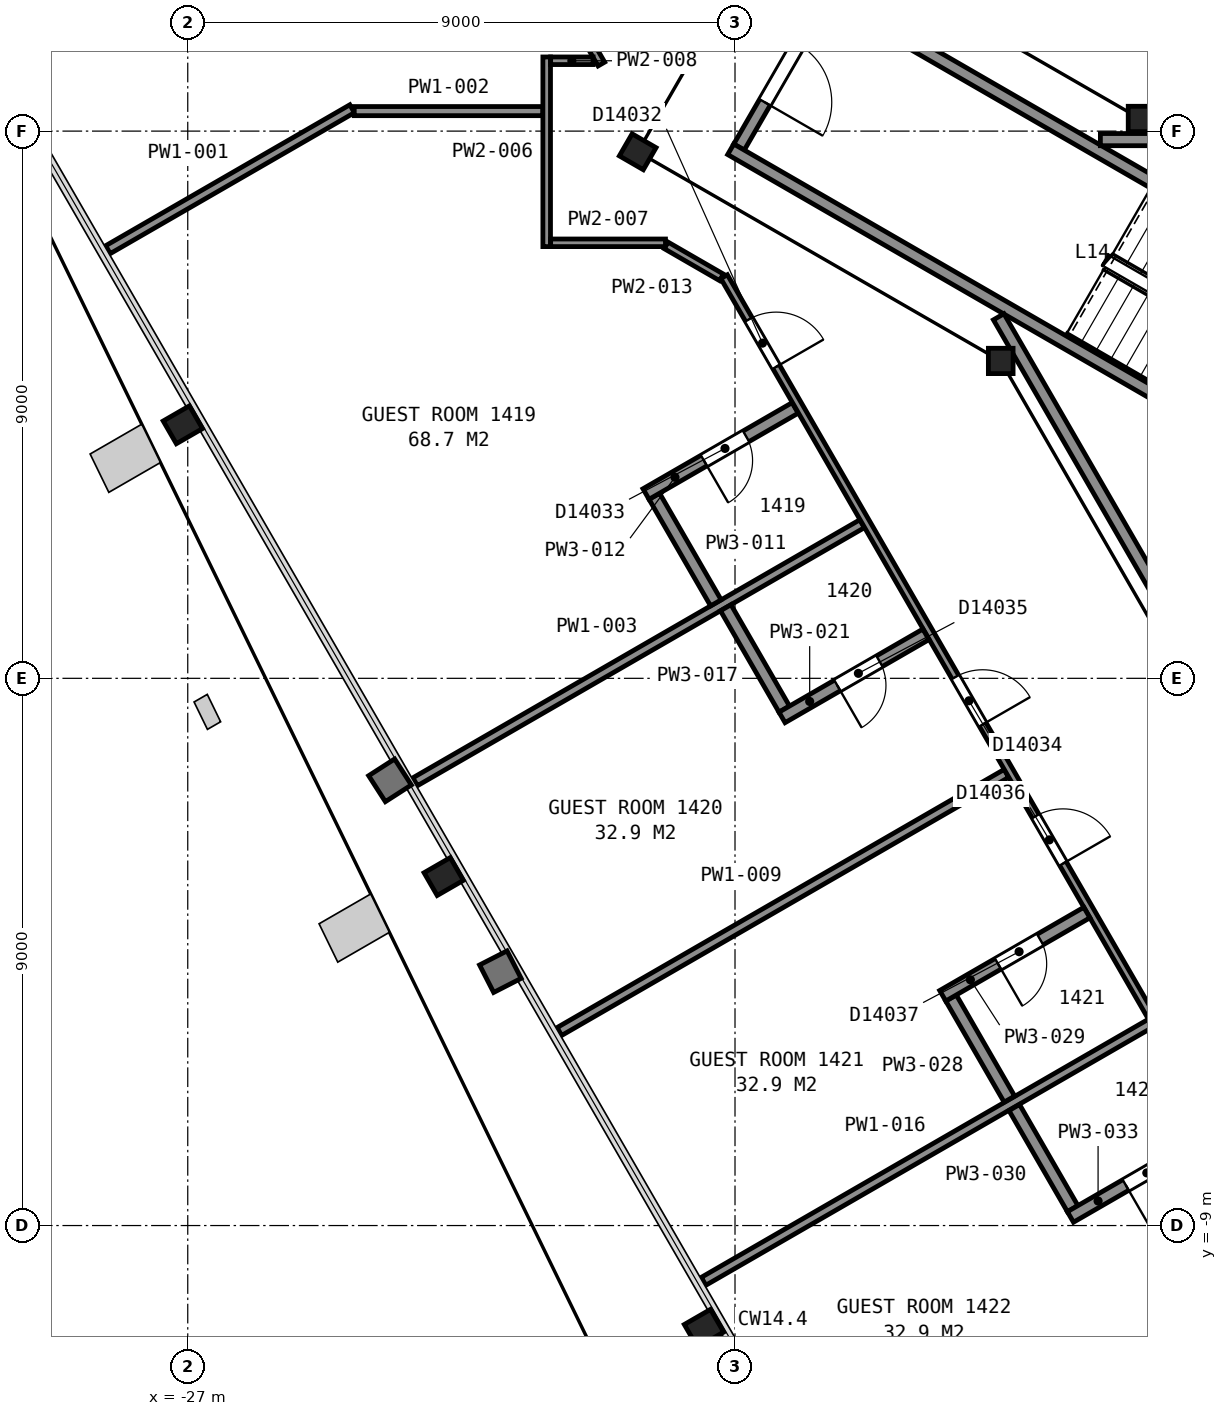
"""IFC4 building model, lengths in metres.
Left out: names, types, materials, properties, quantities, classifications, styles, units other than length and angle.
Written with IfcOpenShell. Run it as: python <this file> out.ifc"""

import sys

from ifc_helpers import new_model, si_unit, direction, frame, frame_2d, origin, origin_2d, place, context, subcontext, project, spatial, rectangle, i_section, extrude, element, fill, save


model = new_model("IFC4")
c1 = context("Model", 3, precision=1e-05, world=origin(), true_north=direction((0.0, 1.0)))
c2 = subcontext(c1, "Body", "Model", "MODEL_VIEW")
j1 = project(units=[si_unit("LENGTHUNIT", "METRE"), si_unit("PLANEANGLEUNIT", "RADIAN")], contexts=[c1])
p1 = place(None, origin())
s1 = spatial("IfcSite", under=j1, at=p1, CompositionType="ELEMENT")
p2 = place(p1, origin())
s2 = spatial("IfcBuilding", under=s1, at=p2, CompositionType="ELEMENT")
p3 = place(p2, frame((0.0, 0.0, 65.6)))
s3 = spatial("IfcBuildingStorey", under=s2, at=p3, CompositionType="ELEMENT", Elevation=65.6)
for number, where, z_axis, x_axis in (
    (1, (-27.08, 4.17, 0.025), (0.0, 0.0, 1.0), (-0.5, 0.866, 0.0)),
    (2, (-22.79, -3.26, 0.025), (0.0, 0.0, 1.0), (-0.5, 0.866, 0.0)),
    (3, (-18.51, -10.69, 0.025), (0.0, 0.0, 1.0), (-0.5, 0.866, 0.0)),
):
    element("IfcColumn", number, at=place(p3, frame(where, z_axis=z_axis, x_axis=x_axis)), inside=s3, PredefinedType="COLUMN", context=c2, shape_type="SweptSolid", body=[
        extrude(i_section(OverallWidth=0.432, OverallDepth=0.498, WebThickness=0.056, FlangeThickness=0.089, FilletRadius=0.015, at=origin_2d()), origin(), (0.0, 0.0, 1.0), 3.575),
    ])
p4 = place(p3, frame((-11.33, 9.2, 0.0), z_axis=(0.0, 0.0, 1.0), x_axis=(1.0, 0.0, 0.0)))
e4 = element("IfcColumn", 4, at=p4, inside=s3, PredefinedType="COLUMN", context=c2, shape_type="SweptSolid", body=[
    extrude(i_section(OverallWidth=0.406, OverallDepth=0.417, WebThickness=0.03, FlangeThickness=0.048, FilletRadius=0.015, at=origin_2d()), origin(), (0.0, 0.0, 1.0), 3.6),
])
p5 = place(p3, frame((-19.6, 8.66, 0.0), z_axis=(0.0, 0.0, 1.0), x_axis=(0.5, 0.866025403784, 0.0)))
e5 = element("IfcColumn", 5, at=p5, inside=s3, PredefinedType="COLUMN", context=c2, shape_type="SweptSolid", body=[
    extrude(i_section(OverallWidth=0.419, OverallDepth=0.455, WebThickness=0.042, FlangeThickness=0.068, FilletRadius=0.015, at=origin_2d()), origin(), (0.0, 0.0, 1.0), 3.6),
])
p6 = place(p3, frame((-13.63, 5.22, 0.0), z_axis=(0.0, 0.0, 1.0), x_axis=(1.0, 0.0, 0.0)))
e6 = element("IfcColumn", 6, at=p6, inside=s3, PredefinedType="COLUMN", context=c2, shape_type="SweptSolid", body=[
    extrude(i_section(OverallWidth=0.406, OverallDepth=0.417, WebThickness=0.03, FlangeThickness=0.048, FilletRadius=0.015, at=origin_2d()), origin(), (0.0, 0.0, 1.0), 3.6),
])
p7 = place(p3, frame((-16.534, 11.162, 0.0), z_axis=(0.0, 0.0, 1.0), x_axis=(-0.49998411664, -0.866034573852, 0.0)))
e7 = element("IfcWall", 7, at=p7, inside=s3, PredefinedType="PARTITIONING", context=c2, shape_type="SweptSolid", body=[
    extrude(rectangle(XDim=2.8, YDim=0.2, at=frame_2d((1.4, 0.0))), origin(), (0.0, 0.0, 1.0), 3.35),
])
p8 = place(p7, frame((0.85, 0.0, 0.0)))
e8 = element("IfcOpeningElement", 8, at=p8, cuts=e7, PredefinedType="OPENING", context=c2, shape_type="SweptSolid", body=[
    extrude(rectangle(XDim=1.1, YDim=2.1, at=frame_2d((0.55, 1.05))), frame((0.0, 0.11, 0.0), z_axis=(0.0, -1.0, 0.0), x_axis=(1.0, 0.0, 0.0)), (0.0, 0.0, 1.0), 0.22),
])
for number, where, z_axis, x_axis in (
    (9, (-7.678, 2.701, 0.0), (0.0, 0.0, 1.0), (-0.866, 0.5, 0.0)),
    (10, (-6.178, 5.299, 0.0), (0.0, 0.0, 1.0), (-0.866, 0.5, 0.0)),
):
    element("IfcWall", number, at=place(p3, frame(where, z_axis=z_axis, x_axis=x_axis)), inside=s3, PredefinedType="PARTITIONING", context=c2, shape_type="SweptSolid", body=[
        extrude(rectangle(XDim=12.0, YDim=0.2, at=frame_2d((6.0, 0.0))), origin(), (0.0, 0.0, 1.0), 3.35),
    ])
p9 = place(p3, frame((-13.664, 5.946, 0.0), z_axis=(0.0, 0.0, 1.0), x_axis=(0.499994327219, -0.866028678941, 0.0)))
e11 = element("IfcWall", 11, at=p9, inside=s3, PredefinedType="PARTITIONING", context=c2, shape_type="SweptSolid", body=[
    extrude(rectangle(XDim=23.968, YDim=0.2, at=frame_2d((11.984, 0.0))), origin(), (0.0, 0.0, 1.0), 3.35),
])
p10 = place(p3, frame((0.263, 8.86, 0.0), z_axis=(0.0, 0.0, 1.0), x_axis=(-1.0, 0.0, 0.0)))
e12 = element("IfcWall", 12, at=p10, inside=s3, PredefinedType="PARTITIONING", context=c2, shape_type="SweptSolid", body=[
    extrude(rectangle(XDim=12.254, YDim=0.2, at=frame_2d((6.127, 0.0))), origin(), (0.0, 0.0, 1.0), 3.35),
])
p11 = place(p10, frame((5.709, 0.0, 0.0)))
e13 = element("IfcOpeningElement", 13, at=p11, cuts=e12, PredefinedType="OPENING", context=c2, shape_type="SweptSolid", body=[
    extrude(rectangle(XDim=1.8, YDim=2.1, at=frame_2d((0.9, 1.05))), frame((0.0, 0.11, 0.0), z_axis=(0.0, -1.0, 0.0), x_axis=(1.0, 0.0, 0.0)), (0.0, 0.0, 1.0), 0.22),
])
p12 = place(p3, frame((-28.313, 7.05, 0.0), z_axis=(0.0, 0.0, 1.0), x_axis=(0.866076865069, 0.499910855846, 0.0)))
e14 = element("IfcWall", 14, at=p12, inside=s3, PredefinedType="PARTITIONING", context=c2, shape_type="SweptSolid", body=[
    extrude(rectangle(XDim=4.636, YDim=0.15, at=frame_2d((2.318, 0.0))), origin(), (0.0, 0.0, 1.0), 2.613),
])
p13 = place(p3, frame((-24.262, 9.329, 0.0), z_axis=(0.0, 0.0, 1.0), x_axis=(1.0, 0.0, 0.0)))
e15 = element("IfcWall", 15, at=p13, inside=s3, PredefinedType="PARTITIONING", context=c2, shape_type="SweptSolid", body=[
    extrude(rectangle(XDim=3.103, YDim=0.15, at=frame_2d((1.551, 0.0))), origin(), (0.0, 0.0, 1.0), 2.613),
])
p14 = place(p3, frame((-23.26, -1.701, 0.0), z_axis=(0.0, 0.0, 1.0), x_axis=(0.866027021296, 0.499997198377, 0.0)))
e16 = element("IfcWall", 16, at=p14, inside=s3, PredefinedType="PARTITIONING", context=c2, shape_type="SweptSolid", body=[
    extrude(rectangle(XDim=8.487, YDim=0.15, at=frame_2d((4.243, 0.0))), origin(), (0.0, 0.0, 1.0), 2.613),
])
p15 = place(p3, frame((-21.132, 11.721, 0.0), z_axis=(0.0, 0.0, 1.0), x_axis=(0.500072997275, -0.865983254686, 0.0)))
e17 = element("IfcWall", 17, at=p15, inside=s3, PredefinedType="PARTITIONING", context=c2, shape_type="SweptSolid", body=[
    extrude(rectangle(XDim=1.869, YDim=0.125, at=frame_2d((0.935, 0.0))), origin(), (0.0, 0.0, 1.0), 2.613),
])
p16 = place(p3, frame((-21.097, 7.101, 0.0), z_axis=(0.0, 0.0, 1.0), x_axis=(0.0, 1.0, 0.0)))
e18 = element("IfcWall", 18, at=p16, inside=s3, PredefinedType="PARTITIONING", context=c2, shape_type="SweptSolid", body=[
    extrude(rectangle(XDim=3.119, YDim=0.125, at=frame_2d((1.56, 0.0))), origin(), (0.0, 0.0, 1.0), 2.613),
])
p17 = place(p3, frame((-21.032, 7.163, 0.0), z_axis=(0.0, 0.0, 1.0), x_axis=(1.0, 0.0, 0.0)))
e19 = element("IfcWall", 19, at=p17, inside=s3, PredefinedType="PARTITIONING", context=c2, shape_type="SweptSolid", body=[
    extrude(rectangle(XDim=1.888, YDim=0.125, at=frame_2d((0.944, 0.0))), origin(), (0.0, 0.0, 1.0), 2.613),
])
p18 = place(p3, frame((-21.032, 10.157, 0.0), z_axis=(0.0, 0.0, 1.0), x_axis=(1.0, 0.0, 0.0)))
e20 = element("IfcWall", 20, at=p18, inside=s3, PredefinedType="PARTITIONING", context=c2, shape_type="SweptSolid", body=[
    extrude(rectangle(XDim=0.698, YDim=0.125, at=frame_2d((0.349, 0.0))), origin(), (0.0, 0.0, 1.0), 2.613),
])
p19 = place(p3, frame((-20.889, -5.809, 0.0), z_axis=(0.0, 0.0, 1.0), x_axis=(0.866022790583, 0.50000452617, 0.0)))
e21 = element("IfcWall", 21, at=p19, inside=s3, PredefinedType="PARTITIONING", context=c2, shape_type="SweptSolid", body=[
    extrude(rectangle(XDim=8.491, YDim=0.15, at=frame_2d((4.246, 0.0))), origin(), (0.0, 0.0, 1.0), 2.613),
])
p20 = place(p3, frame((-19.327, 2.994, 0.0), z_axis=(0.0, 0.0, 1.0), x_axis=(0.500042536776, -0.866000843773, 0.0)))
e22 = element("IfcWall", 22, at=p20, inside=s3, PredefinedType="PARTITIONING", context=c2, shape_type="SweptSolid", body=[
    extrude(rectangle(XDim=2.025, YDim=0.2, at=frame_2d((1.012, 0.0))), origin(), (0.0, 0.0, 1.0), 2.613),
])
p21 = place(p3, frame((-17.01, 4.447, 0.0), z_axis=(0.0, 0.0, 1.0), x_axis=(-0.866033446572, -0.499986069224, 0.0)))
e23 = element("IfcWall", 23, at=p21, inside=s3, PredefinedType="PARTITIONING", context=c2, shape_type="SweptSolid", body=[
    extrude(rectangle(XDim=2.833, YDim=0.2, at=frame_2d((1.416, 0.0))), origin(), (0.0, 0.0, 1.0), 2.613),
])
p22 = place(p21, frame((0.933, 0.0, 0.0)))
e24 = element("IfcOpeningElement", 24, at=p22, cuts=e23, PredefinedType="OPENING", context=c2, shape_type="SweptSolid", body=[
    extrude(rectangle(XDim=0.8, YDim=2.1, at=frame_2d((0.4, 1.05))), frame((0.0, 0.11, 0.0), z_axis=(0.0, -1.0, 0.0), x_axis=(1.0, 0.0, 0.0)), (0.0, 0.0, 1.0), 0.22),
])
p23 = place(p3, frame((-19.132, 7.121, 0.0), z_axis=(0.0, 0.0, 1.0), x_axis=(0.865876245925, -0.500258260045, 0.0)))
e25 = element("IfcWall", 25, at=p23, inside=s3, PredefinedType="PARTITIONING", context=c2, shape_type="SweptSolid", body=[
    extrude(rectangle(XDim=1.052, YDim=0.125, at=frame_2d((0.526, 0.0))), origin(), (0.0, 0.0, 1.0), 2.613),
])
p24 = place(p3, frame((-18.517, -9.917, 0.0), z_axis=(0.0, 0.0, 1.0), x_axis=(0.866017528739, 0.50001363973, 0.0)))
e26 = element("IfcWall", 26, at=p24, inside=s3, PredefinedType="PARTITIONING", context=c2, shape_type="SweptSolid", body=[
    extrude(rectangle(XDim=8.491, YDim=0.15, at=frame_2d((4.246, 0.0))), origin(), (0.0, 0.0, 1.0), 2.613),
])
p25 = place(p3, frame((-18.153, 1.161, 0.0), z_axis=(0.0, 0.0, 1.0), x_axis=(0.499971247393, -0.866042003473, 0.0)))
e27 = element("IfcWall", 27, at=p25, inside=s3, PredefinedType="PARTITIONING", context=c2, shape_type="SweptSolid", body=[
    extrude(rectangle(XDim=1.925, YDim=0.2, at=frame_2d((0.963, 0.0))), origin(), (0.0, 0.0, 1.0), 2.613),
])
p26 = place(p3, frame((-3.766, -18.358, 0.0), z_axis=(0.0, 0.0, 1.0), x_axis=(-0.500003973642, 0.866023109589, 0.0)))
e28 = element("IfcWall", 28, at=p26, inside=s3, PredefinedType="PARTITIONING", context=c2, shape_type="SweptSolid", body=[
    extrude(rectangle(XDim=28.826, YDim=0.125, at=frame_2d((14.413, 0.0))), origin(), (0.0, 0.0, 1.0), 2.613),
])
p27 = place(p26, frame((27.114, 0.0, 0.0)))
e29 = element("IfcOpeningElement", 29, at=p27, cuts=e28, PredefinedType="OPENING", context=c2, shape_type="SweptSolid", body=[
    extrude(rectangle(XDim=0.9, YDim=2.1, at=frame_2d((0.45, 1.05))), frame((0.0, 0.073, 0.0), z_axis=(0.0, -1.0, 0.0), x_axis=(1.0, 0.0, 0.0)), (0.0, 0.0, 1.0), 0.145),
])
p28 = place(p26, frame((20.322, 0.0, 0.0)))
e30 = element("IfcOpeningElement", 30, at=p28, cuts=e28, PredefinedType="OPENING", context=c2, shape_type="SweptSolid", body=[
    extrude(rectangle(XDim=0.9, YDim=2.1, at=frame_2d((0.45, 1.05))), frame((0.0, 0.073, 0.0), z_axis=(0.0, -1.0, 0.0), x_axis=(1.0, 0.0, 0.0)), (0.0, 0.0, 1.0), 0.145),
])
p29 = place(p26, frame((17.68, 0.0, 0.0)))
e31 = element("IfcOpeningElement", 31, at=p29, cuts=e28, PredefinedType="OPENING", context=c2, shape_type="SweptSolid", body=[
    extrude(rectangle(XDim=0.9, YDim=2.1, at=frame_2d((0.45, 1.05))), frame((0.0, 0.073, 0.0), z_axis=(0.0, -1.0, 0.0), x_axis=(1.0, 0.0, 0.0)), (0.0, 0.0, 1.0), 0.145),
])
p30 = place(p26, frame((10.836, 0.0, 0.0)))
e32 = element("IfcOpeningElement", 32, at=p30, cuts=e28, PredefinedType="OPENING", context=c2, shape_type="SweptSolid", body=[
    extrude(rectangle(XDim=0.9, YDim=2.1, at=frame_2d((0.45, 1.05))), frame((0.0, 0.073, 0.0), z_axis=(0.0, -1.0, 0.0), x_axis=(1.0, 0.0, 0.0)), (0.0, 0.0, 1.0), 0.145),
])
p31 = place(p26, frame((7.342, 0.0, 0.0)))
e33 = element("IfcOpeningElement", 33, at=p31, cuts=e28, PredefinedType="OPENING", context=c2, shape_type="SweptSolid", body=[
    extrude(rectangle(XDim=0.9, YDim=2.1, at=frame_2d((0.45, 1.05))), frame((0.0, 0.073, 0.0), z_axis=(0.0, -1.0, 0.0), x_axis=(1.0, 0.0, 0.0)), (0.0, 0.0, 1.0), 0.145),
])
p32 = place(p3, frame((-17.227, -0.643, 0.0), z_axis=(0.0, 0.0, 1.0), x_axis=(0.866012976267, 0.500021524473, 0.0)))
e34 = element("IfcWall", 34, at=p32, inside=s3, PredefinedType="PARTITIONING", context=c2, shape_type="SweptSolid", body=[
    extrude(rectangle(XDim=2.732, YDim=0.2, at=frame_2d((1.366, 0.0))), origin(), (0.0, 0.0, 1.0), 2.613),
])
p33 = place(p32, frame((1.05, 0.0, 0.0)))
e35 = element("IfcOpeningElement", 35, at=p33, cuts=e34, PredefinedType="OPENING", context=c2, shape_type="SweptSolid", body=[
    extrude(rectangle(XDim=0.8, YDim=2.1, at=frame_2d((0.4, 1.05))), frame((0.0, 0.11, 0.0), z_axis=(0.0, -1.0, 0.0), x_axis=(1.0, 0.0, 0.0)), (0.0, 0.0, 1.0), 0.22),
])
p34 = place(p3, frame((-16.145, -14.025, 0.0), z_axis=(0.0, 0.0, 1.0), x_axis=(0.866024716685, 0.500001190089, 0.0)))
e36 = element("IfcWall", 36, at=p34, inside=s3, PredefinedType="PARTITIONING", context=c2, shape_type="SweptSolid", body=[
    extrude(rectangle(XDim=8.492, YDim=0.15, at=frame_2d((4.246, 0.0))), origin(), (0.0, 0.0, 1.0), 2.613),
])
p35 = place(p3, frame((-14.447, -5.258, 0.0), z_axis=(0.0, 0.0, 1.0), x_axis=(0.499667418833, -0.866217334482, 0.0)))
e37 = element("IfcWall", 37, at=p35, inside=s3, PredefinedType="PARTITIONING", context=c2, shape_type="SweptSolid", body=[
    extrude(rectangle(XDim=1.92, YDim=0.2, at=frame_2d((0.96, 0.0))), origin(), (0.0, 0.0, 1.0), 2.613),
])
p36 = place(p3, frame((-12.213, -3.852, 0.0), z_axis=(0.0, 0.0, 1.0), x_axis=(-0.866005850709, -0.50003386539, 0.0)))
e38 = element("IfcWall", 38, at=p36, inside=s3, PredefinedType="PARTITIONING", context=c2, shape_type="SweptSolid", body=[
    extrude(rectangle(XDim=2.737, YDim=0.2, at=frame_2d((1.369, 0.0))), origin(), (0.0, 0.0, 1.0), 2.613),
])
p37 = place(p36, frame((0.887, 0.0, 0.0)))
e39 = element("IfcOpeningElement", 39, at=p37, cuts=e38, PredefinedType="OPENING", context=c2, shape_type="SweptSolid", body=[
    extrude(rectangle(XDim=0.8, YDim=2.1, at=frame_2d((0.4, 1.05))), frame((0.0, 0.11, 0.0), z_axis=(0.0, -1.0, 0.0), x_axis=(1.0, 0.0, 0.0)), (0.0, 0.0, 1.0), 0.22),
])
p38 = place(p3, frame((-13.407, -7.059, 0.0), z_axis=(0.0, 0.0, 1.0), x_axis=(0.499993829411, -0.866028966346, 0.0)))
e40 = element("IfcWall", 40, at=p38, inside=s3, PredefinedType="PARTITIONING", context=c2, shape_type="SweptSolid", body=[
    extrude(rectangle(XDim=1.921, YDim=0.2, at=frame_2d((0.96, 0.0))), origin(), (0.0, 0.0, 1.0), 2.613),
])
p39 = place(p3, frame((-12.484, -8.859, 0.0), z_axis=(0.0, 0.0, 1.0), x_axis=(0.866028150195, 0.499995243048, 0.0)))
e41 = element("IfcWall", 41, at=p39, inside=s3, PredefinedType="PARTITIONING", context=c2, shape_type="SweptSolid", body=[
    extrude(rectangle(XDim=2.737, YDim=0.2, at=frame_2d((1.369, 0.0))), origin(), (0.0, 0.0, 1.0), 2.613),
])
p40 = place(p39, frame((1.05, 0.0, 0.0)))
e42 = element("IfcOpeningElement", 42, at=p40, cuts=e41, PredefinedType="OPENING", context=c2, shape_type="SweptSolid", body=[
    extrude(rectangle(XDim=0.8, YDim=2.1, at=frame_2d((0.4, 1.05))), frame((0.0, 0.11, 0.0), z_axis=(0.0, -1.0, 0.0), x_axis=(1.0, 0.0, 0.0)), (0.0, 0.0, 1.0), 0.22),
])
p41 = place(p8, origin())
e43 = element("IfcDoor", 43, at=p41, inside=s3, OperationType="SINGLE_SWING_RIGHT", PredefinedType="DOOR", context=c2, shape_type="SweptSolid", body=[
    extrude(rectangle(XDim=1.1, YDim=2.1, at=frame_2d((0.55, 1.05))), frame((0.0, 0.025, 0.0), z_axis=(0.0, -1.0, 0.0), x_axis=(1.0, 0.0, 0.0)), (0.0, 0.0, 1.0), 0.05),
])
fill(e8, e43)
p42 = place(p22, origin())
e44 = element("IfcDoor", 44, at=p42, inside=s3, OperationType="SINGLE_SWING_RIGHT", PredefinedType="DOOR", context=c2, shape_type="SweptSolid", body=[
    extrude(rectangle(XDim=0.8, YDim=2.1, at=frame_2d((0.4, 1.05))), frame((0.0, 0.025, 0.0), z_axis=(0.0, -1.0, 0.0), x_axis=(1.0, 0.0, 0.0)), (0.0, 0.0, 1.0), 0.05),
])
fill(e24, e44)
p43 = place(p27, origin())
e45 = element("IfcDoor", 45, at=p43, inside=s3, OperationType="SINGLE_SWING_LEFT", PredefinedType="DOOR", context=c2, shape_type="SweptSolid", body=[
    extrude(rectangle(XDim=0.9, YDim=2.1, at=frame_2d((0.45, 1.05))), frame((0.0, 0.025, 0.0), z_axis=(0.0, -1.0, 0.0), x_axis=(1.0, 0.0, 0.0)), (0.0, 0.0, 1.0), 0.05),
])
fill(e29, e45)
p44 = place(p28, origin())
e46 = element("IfcDoor", 46, at=p44, inside=s3, OperationType="SINGLE_SWING_LEFT", PredefinedType="DOOR", context=c2, shape_type="SweptSolid", body=[
    extrude(rectangle(XDim=0.9, YDim=2.1, at=frame_2d((0.45, 1.05))), frame((0.0, 0.025, 0.0), z_axis=(0.0, -1.0, 0.0), x_axis=(1.0, 0.0, 0.0)), (0.0, 0.0, 1.0), 0.05),
])
fill(e30, e46)
p45 = place(p29, origin())
e47 = element("IfcDoor", 47, at=p45, inside=s3, OperationType="SINGLE_SWING_LEFT", PredefinedType="DOOR", context=c2, shape_type="SweptSolid", body=[
    extrude(rectangle(XDim=0.9, YDim=2.1, at=frame_2d((0.45, 1.05))), frame((0.0, 0.025, 0.0), z_axis=(0.0, -1.0, 0.0), x_axis=(1.0, 0.0, 0.0)), (0.0, 0.0, 1.0), 0.05),
])
fill(e31, e47)
p46 = place(p33, origin())
e48 = element("IfcDoor", 48, at=p46, inside=s3, OperationType="SINGLE_SWING_LEFT", PredefinedType="DOOR", context=c2, shape_type="SweptSolid", body=[
    extrude(rectangle(XDim=0.8, YDim=2.1, at=frame_2d((0.4, 1.05))), frame((0.0, 0.025, 0.0), z_axis=(0.0, -1.0, 0.0), x_axis=(1.0, 0.0, 0.0)), (0.0, 0.0, 1.0), 0.05),
])
fill(e35, e48)
p47 = place(p37, origin())
e49 = element("IfcDoor", 49, at=p47, inside=s3, OperationType="SINGLE_SWING_RIGHT", PredefinedType="DOOR", context=c2, shape_type="SweptSolid", body=[
    extrude(rectangle(XDim=0.8, YDim=2.1, at=frame_2d((0.4, 1.05))), frame((0.0, 0.025, 0.0), z_axis=(0.0, -1.0, 0.0), x_axis=(1.0, 0.0, 0.0)), (0.0, 0.0, 1.0), 0.05),
])
fill(e39, e49)
p48 = place(p40, origin())
e50 = element("IfcDoor", 50, at=p48, inside=s3, OperationType="SINGLE_SWING_LEFT", PredefinedType="DOOR", context=c2, shape_type="SweptSolid", body=[
    extrude(rectangle(XDim=0.8, YDim=2.1, at=frame_2d((0.4, 1.05))), frame((0.0, 0.025, 0.0), z_axis=(0.0, -1.0, 0.0), x_axis=(1.0, 0.0, 0.0)), (0.0, 0.0, 1.0), 0.05),
])
fill(e42, e50)
save(model, sys.argv[1])
